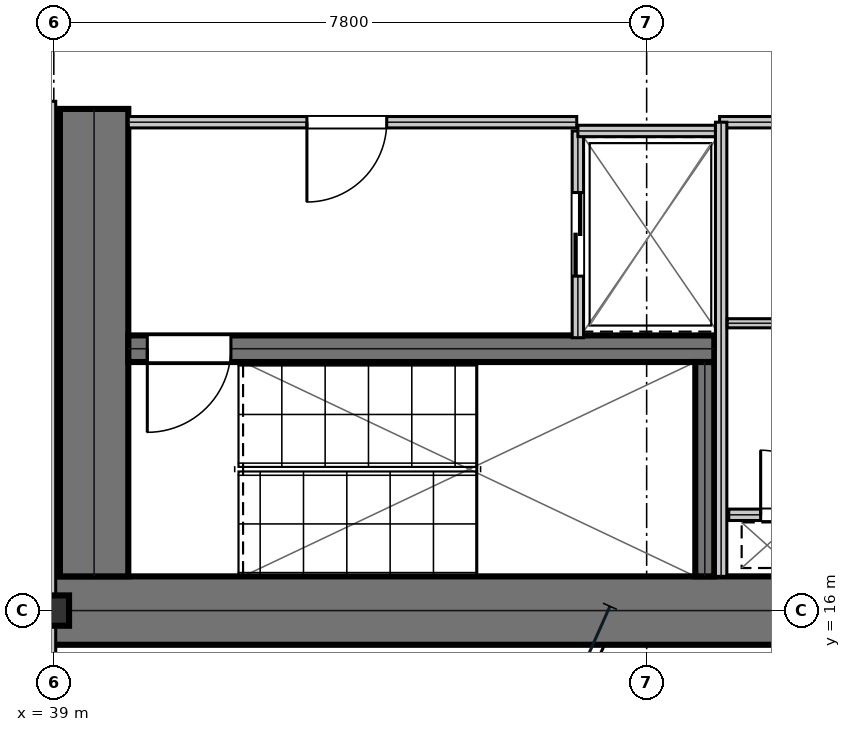
"""IFC4 building model, lengths in metres.
Left out: names, types, materials, properties, quantities, classifications, styles, units other than length and angle.
Written with IfcOpenShell. Run it as: python <this file> out.ifc"""

import sys

from ifc_helpers import new_model, si_unit, direction, frame, frame_2d, origin, origin_2d, place, context, subcontext, project, spatial, rectangle, i_section, extrude, element, fill, save


model = new_model("IFC4")
c1 = context("Model", 3, precision=1e-05, world=origin(), true_north=direction((0.0, 1.0)))
c2 = subcontext(c1, "Body", "Model", "MODEL_VIEW")
j1 = project(units=[si_unit("LENGTHUNIT", "METRE"), si_unit("PLANEANGLEUNIT", "RADIAN")], contexts=[c1])
p1 = place(None, origin())
s1 = spatial("IfcSite", under=j1, at=p1, CompositionType="ELEMENT")
p2 = place(p1, origin())
s2 = spatial("IfcBuilding", under=s1, at=p2, CompositionType="ELEMENT")
p3 = place(p2, frame((0.0, 0.0, 98.55)))
s3 = spatial("IfcBuildingStorey", under=s2, at=p3, CompositionType="ELEMENT", Elevation=98.55)
p4 = place(p3, frame((38.8, 16.0, 0.0), z_axis=(0.0, 0.0, 1.0), x_axis=(1.0, 0.0, 0.0)))
e1 = element("IfcWall", 1, at=p4, inside=s3, PredefinedType="SHEAR", context=c2, shape_type="SweptSolid", body=[
    extrude(rectangle(XDim=16.0, YDim=0.9, at=frame_2d((8.0, 0.0))), origin(), (0.0, 0.0, 1.0), 3.81),
])
p5 = place(p3, frame((39.53, 16.45, 0.0), z_axis=(0.0, 0.0, 1.0), x_axis=(0.0, 1.0, 0.0)))
e2 = element("IfcWall", 2, at=p5, inside=s3, PredefinedType="SHEAR", context=c2, shape_type="SweptSolid", body=[
    extrude(rectangle(XDim=6.15, YDim=0.9, at=frame_2d((3.075, 0.0))), origin(), (0.0, 0.0, 1.0), 3.81),
])
p6 = place(p3, frame((39.98, 19.445, 0.0), z_axis=(0.0, 0.0, 1.0), x_axis=(1.0, 0.0, 0.0)))
e3 = element("IfcWall", 3, at=p6, inside=s3, PredefinedType="SHEAR", context=c2, shape_type="SweptSolid", body=[
    extrude(rectangle(XDim=7.71, YDim=0.35, at=frame_2d((3.855, 0.0))), origin(), (0.0, 0.0, 1.0), 3.81),
])
p7 = place(p6, frame((0.25, 0.0, 0.0)))
e4 = element("IfcOpeningElement", 4, at=p7, cuts=e3, PredefinedType="OPENING", context=c2, shape_type="SweptSolid", body=[
    extrude(rectangle(XDim=1.1, YDim=2.15, at=frame_2d((0.55, 1.075))), frame((0.0, 0.185, 0.0), z_axis=(0.0, -1.0, 0.0), x_axis=(1.0, 0.0, 0.0)), (0.0, 0.0, 1.0), 0.37),
])
p8 = place(p3, frame((47.565, 16.45, 0.0), z_axis=(0.0, 0.0, 1.0), x_axis=(0.0, 1.0, 0.0)))
e5 = element("IfcWall", 5, at=p8, inside=s3, PredefinedType="SHEAR", context=c2, shape_type="SweptSolid", body=[
    extrude(rectangle(XDim=2.82, YDim=0.25, at=frame_2d((1.41, 0.0))), origin(), (0.0, 0.0, 1.0), 3.81),
])
p9 = place(p3, frame((39.0, 16.0, 0.0), z_axis=(0.0, 0.0, 1.0), x_axis=(1.0, 0.0, 0.0)))
e6 = element("IfcColumn", 6, at=p9, inside=s3, PredefinedType="COLUMN", context=c2, shape_type="SweptSolid", body=[
    extrude(i_section(OverallWidth=0.401, OverallDepth=0.399, WebThickness=0.025, FlangeThickness=0.04, at=origin_2d()), origin(), (0.0, 0.0, 1.0), 4.044),
])
p10 = place(p3, frame((39.98, 22.425, 0.0), z_axis=(0.0, 0.0, 1.0), x_axis=(1.0, 0.0, 0.0)))
e7 = element("IfcWall", 7, at=p10, inside=s3, PredefinedType="PARTITIONING", context=c2, shape_type="SweptSolid", body=[
    extrude(rectangle(XDim=5.9, YDim=0.15, at=frame_2d((2.95, 0.0))), origin(), (0.0, 0.0, 1.0), 3.81),
])
p11 = place(p10, frame((2.35, 0.0, 0.0)))
e8 = element("IfcOpeningElement", 8, at=p11, cuts=e7, PredefinedType="OPENING", context=c2, shape_type="SweptSolid", body=[
    extrude(rectangle(XDim=1.05, YDim=2.15, at=frame_2d((0.525, 1.075))), frame((0.0, 0.085, 0.0), z_axis=(0.0, -1.0, 0.0), x_axis=(1.0, 0.0, 0.0)), (0.0, 0.0, 1.0), 0.17),
])
p12 = place(p3, frame((45.895, 19.59, 0.0), z_axis=(0.0, 0.0, 1.0), x_axis=(0.0, 1.0, 0.0)))
e9 = element("IfcWall", 9, at=p12, inside=s3, PredefinedType="PARTITIONING", context=c2, shape_type="SweptSolid", body=[
    extrude(rectangle(XDim=2.72, YDim=0.15, at=frame_2d((1.36, 0.0))), origin(), (0.0, 0.0, 1.0), 3.81),
])
p13 = place(p12, frame((0.81, 0.0, 0.0)))
e10 = element("IfcOpeningElement", 10, at=p13, cuts=e9, PredefinedType="OPENING", context=c2, shape_type="SweptSolid", body=[
    extrude(rectangle(XDim=1.1, YDim=2.15, at=frame_2d((0.55, 1.075))), frame((0.0, 0.085, 0.0), z_axis=(0.0, -1.0, 0.0), x_axis=(1.0, 0.0, 0.0)), (0.0, 0.0, 1.0), 0.17),
])
p14 = place(p3, frame((45.895, 22.31, 0.0), z_axis=(0.0, 0.0, 1.0), x_axis=(1.0, 0.0, 0.0)))
e11 = element("IfcWall", 11, at=p14, inside=s3, PredefinedType="PARTITIONING", context=c2, shape_type="SweptSolid", body=[
    extrude(rectangle(XDim=1.915, YDim=0.15, at=frame_2d((0.958, 0.0))), origin(), (0.0, 0.0, 1.0), 3.81),
])
p15 = place(p3, frame((47.88, 17.26, 0.0), z_axis=(0.0, 0.0, 1.0), x_axis=(1.0, 0.0, 0.0)))
e12 = element("IfcWall", 12, at=p15, inside=s3, PredefinedType="PARTITIONING", context=c2, shape_type="SweptSolid", body=[
    extrude(rectangle(XDim=1.72, YDim=0.15, at=frame_2d((0.86, 0.0))), origin(), (0.0, 0.0, 1.0), 3.81),
])
p16 = place(p15, frame((0.42, 0.0, 0.0)))
e13 = element("IfcOpeningElement", 13, at=p16, cuts=e12, PredefinedType="OPENING", context=c2, shape_type="SweptSolid", body=[
    extrude(rectangle(XDim=0.85, YDim=2.15, at=frame_2d((0.425, 1.075))), frame((0.0, 0.085, 0.0), z_axis=(0.0, -1.0, 0.0), x_axis=(1.0, 0.0, 0.0)), (0.0, 0.0, 1.0), 0.17),
])
p17 = place(p3, frame((47.76, 22.425, 0.0), z_axis=(0.0, 0.0, 1.0), x_axis=(1.0, 0.0, 0.0)))
e14 = element("IfcWall", 14, at=p17, inside=s3, PredefinedType="PARTITIONING", context=c2, shape_type="SweptSolid", body=[
    extrude(rectangle(XDim=1.96, YDim=0.15, at=frame_2d((0.98, 0.0))), origin(), (0.0, 0.0, 1.0), 3.81),
])
p18 = place(p3, frame((47.78, 16.45, 0.0), z_axis=(0.0, 0.0, 1.0), x_axis=(0.0, 1.0, 0.0)))
e15 = element("IfcWall", 15, at=p18, inside=s3, PredefinedType="PARTITIONING", context=c2, shape_type="SweptSolid", body=[
    extrude(rectangle(XDim=5.975, YDim=0.15, at=frame_2d((2.988, 0.0))), origin(), (0.0, 0.0, 1.0), 3.81),
])
p19 = place(p3, frame((47.86, 19.78, 0.0), z_axis=(0.0, 0.0, 1.0), x_axis=(1.0, 0.0, 0.0)))
e16 = element("IfcWall", 16, at=p19, inside=s3, PredefinedType="PARTITIONING", context=c2, shape_type="SweptSolid", body=[
    extrude(rectangle(XDim=1.76, YDim=0.12, at=frame_2d((0.88, 0.0))), origin(), (0.0, 0.0, 1.0), 3.81),
])
p20 = place(p3, frame((38.95, 14.5, 0.0), z_axis=(0.0, 0.0, 1.0), x_axis=(0.0, 1.0, 0.0)))
e17 = element("IfcWall", 17, at=p20, inside=s3, PredefinedType="PARTITIONING", context=c2, shape_type="SweptSolid", body=[
    extrude(rectangle(XDim=8.2, YDim=0.15, at=frame_2d((4.1, 0.0))), origin(), (0.0, 0.0, 1.0), 3.181),
])
p21 = place(p11, frame((1.05, 0.0, 0.0), z_axis=(0.0, 0.0, 1.0), x_axis=(-1.0, 0.0, 0.0)))
e18 = element("IfcDoor", 18, at=p21, inside=s3, OperationType="SINGLE_SWING_RIGHT", PredefinedType="DOOR", context=c2, shape_type="SweptSolid", body=[
    extrude(rectangle(XDim=1.05, YDim=2.15, at=frame_2d((0.525, 1.075))), frame((0.0, 0.025, 0.0), z_axis=(0.0, -1.0, 0.0), x_axis=(1.0, 0.0, 0.0)), (0.0, 0.0, 1.0), 0.05),
])
fill(e8, e18)
p22 = place(p13, frame((1.1, 0.0, 0.0), z_axis=(0.0, 0.0, 1.0), x_axis=(-1.0, 0.0, 0.0)))
e19 = element("IfcDoor", 19, at=p22, inside=s3, OperationType="DOUBLE_DOOR_SLIDING", PredefinedType="DOOR", context=c2, shape_type="SweptSolid", body=[
    extrude(rectangle(XDim=1.1, YDim=2.15, at=frame_2d((0.55, 1.075))), frame((0.0, 0.025, 0.0), z_axis=(0.0, -1.0, 0.0), x_axis=(1.0, 0.0, 0.0)), (0.0, 0.0, 1.0), 0.05),
])
fill(e10, e19)
p23 = place(p16, origin())
e20 = element("IfcDoor", 20, at=p23, inside=s3, OperationType="SINGLE_SWING_LEFT", PredefinedType="TRAPDOOR", context=c2, shape_type="SweptSolid", body=[
    extrude(rectangle(XDim=0.85, YDim=2.15, at=frame_2d((0.425, 1.075))), frame((0.0, 0.025, 0.0), z_axis=(0.0, -1.0, 0.0), x_axis=(1.0, 0.0, 0.0)), (0.0, 0.0, 1.0), 0.05),
])
fill(e13, e20)
p24 = place(p7, frame((1.1, 0.0, 0.0), z_axis=(0.0, 0.0, 1.0), x_axis=(-1.0, 0.0, 0.0)))
e21 = element("IfcDoor", 21, at=p24, inside=s3, OperationType="SINGLE_SWING_RIGHT", PredefinedType="DOOR", context=c2, shape_type="SweptSolid", body=[
    extrude(rectangle(XDim=1.1, YDim=2.15, at=frame_2d((0.55, 1.075))), frame((0.0, 0.025, 0.0), z_axis=(0.0, -1.0, 0.0), x_axis=(1.0, 0.0, 0.0)), (0.0, 0.0, 1.0), 0.05),
])
fill(e4, e21)
save(model, sys.argv[1])
